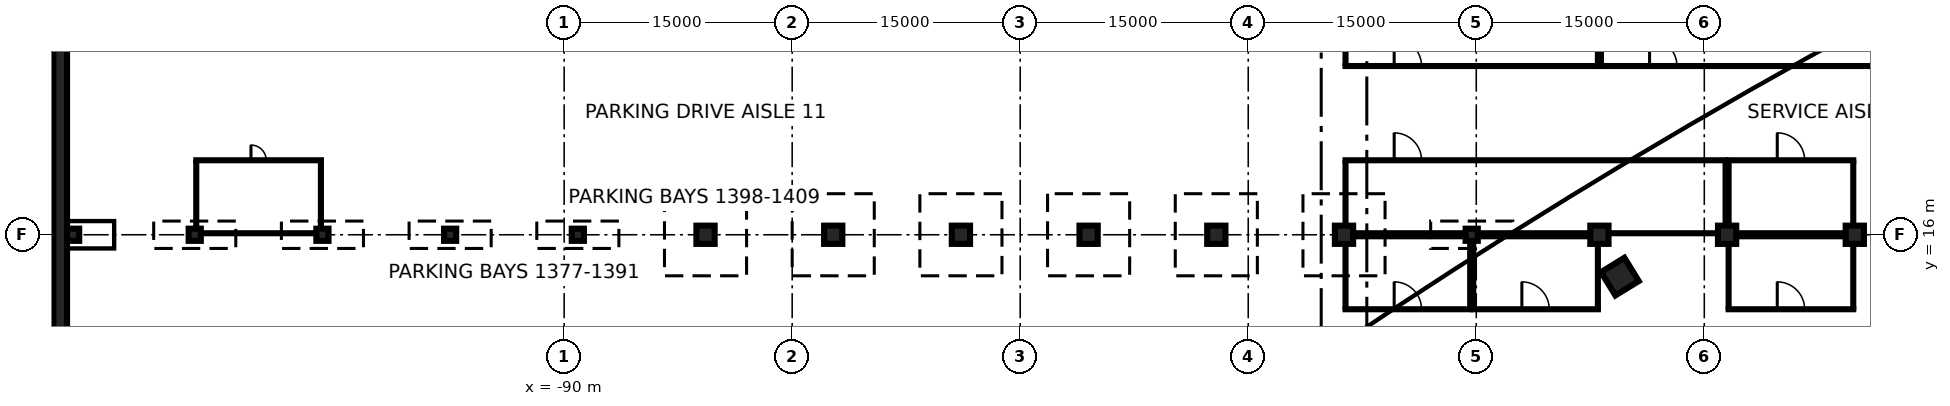
"""IFC4 building model, lengths in metres.
Left out: names, types, materials, properties, quantities, classifications, styles, units other than length and angle.
Written with IfcOpenShell. Run it as: python <this file> out.ifc"""

import sys

from ifc_helpers import new_model, si_unit, direction, frame, frame_2d, origin, origin_2d, place, context, subcontext, project, spatial, rectangle, extrude, element, fill, save


model = new_model("IFC4")
c1 = context("Model", 3, precision=1e-05, world=origin(), true_north=direction((0.0, 1.0)))
c2 = subcontext(c1, "Body", "Model", "MODEL_VIEW")
j1 = project(units=[si_unit("LENGTHUNIT", "METRE"), si_unit("PLANEANGLEUNIT", "RADIAN")], contexts=[c1])
p1 = place(None, origin())
s1 = spatial("IfcSite", under=j1, at=p1, CompositionType="ELEMENT")
p2 = place(p1, origin())
s2 = spatial("IfcBuilding", under=s1, at=p2, CompositionType="ELEMENT")
p3 = place(p2, frame((0.0, 0.0, -12.0)))
s3 = spatial("IfcBuildingStorey", under=s2, at=p3, CompositionType="ELEMENT", Elevation=-12.0)
p4 = place(p3, frame((-123.15, -80.0, 0.0), z_axis=(0.0, 0.0, 1.0), x_axis=(0.0, 1.0, 0.0)))
e1 = element("IfcWall", 1, at=p4, inside=s3, PredefinedType="USERDEFINED", context=c2, shape_type="SweptSolid", body=[
    extrude(rectangle(XDim=160.0, YDim=0.9, at=frame_2d((80.0, 0.0))), origin(), (0.0, 0.0, 1.0), 11.55),
])
p5 = place(p3, frame((-20.552, 13.248, 0.0), z_axis=(0.0, 0.0, 1.0), x_axis=(-0.523429826947, 0.85206878611, 0.0)))
e2 = element("IfcColumn", 2, at=p5, inside=s3, PredefinedType="COLUMN", context=c2, shape_type="SweptSolid", body=[
    extrude(rectangle(XDim=1.8, YDim=1.8, at=origin_2d()), origin(), (0.0, 0.0, 1.0), 4.4),
])
for number, where, z_axis, x_axis in (
    (3, (-122.3, 16.0, 0.0), (0.0, 0.0, 1.0), (1.0, 0.0, 0.0)),
    (4, (-114.3, 16.0, 0.0), (0.0, 0.0, 1.0), (1.0, 0.0, 0.0)),
    (5, (-105.9, 16.0, 0.0), (0.0, 0.0, 1.0), (1.0, 0.0, 0.0)),
    (6, (-97.5, 16.0, 0.0), (0.0, 0.0, 1.0), (1.0, 0.0, 0.0)),
    (7, (-89.1, 16.0, 0.0), (0.0, 0.0, 1.0), (1.0, 0.0, 0.0)),
):
    element("IfcColumn", number, at=place(p3, frame(where, z_axis=z_axis, x_axis=x_axis)), inside=s3, PredefinedType="COLUMN", context=c2, shape_type="SweptSolid", body=[
        extrude(rectangle(XDim=0.8, YDim=0.8, at=origin_2d()), origin(), (0.0, 0.0, 1.0), 4.4),
    ])
for number, where, z_axis, x_axis in (
    (8, (-80.7, 16.0, 0.0), (0.0, 0.0, 1.0), (1.0, 0.0, 0.0)),
    (9, (-72.3, 16.0, 0.0), (0.0, 0.0, 1.0), (1.0, 0.0, 0.0)),
    (10, (-63.9, 16.0, 0.0), (0.0, 0.0, 1.0), (1.0, 0.0, 0.0)),
    (11, (-55.5, 16.0, 0.0), (0.0, 0.0, 1.0), (1.0, 0.0, 0.0)),
    (12, (-47.1, 16.0, 0.0), (0.0, 0.0, 1.0), (1.0, 0.0, 0.0)),
    (13, (-38.7, 16.0, 0.0), (0.0, 0.0, 1.0), (1.0, 0.0, 0.0)),
):
    element("IfcColumn", number, at=place(p3, frame(where, z_axis=z_axis, x_axis=x_axis)), inside=s3, PredefinedType="COLUMN", context=c2, shape_type="SweptSolid", body=[
        extrude(rectangle(XDim=1.2, YDim=1.2, at=origin_2d()), origin(), (0.0, 0.0, 1.0), 4.4),
    ])
p6 = place(p3, frame((-30.3, 16.0, 0.0), z_axis=(0.0, 0.0, 1.0), x_axis=(1.0, 0.0, 0.0)))
e14 = element("IfcColumn", 14, at=p6, inside=s3, PredefinedType="COLUMN", context=c2, shape_type="SweptSolid", body=[
    extrude(rectangle(XDim=0.8, YDim=0.8, at=origin_2d()), origin(), (0.0, 0.0, 1.0), 4.4),
])
for number, where, z_axis, x_axis in (
    (15, (-21.9, 16.0, 0.0), (0.0, 0.0, 1.0), (1.0, 0.0, 0.0)),
    (16, (-13.5, 16.0, 0.0), (0.0, 0.0, 1.0), (1.0, 0.0, 0.0)),
    (17, (-5.1, 16.0, 0.0), (0.0, 0.0, 1.0), (1.0, 0.0, 0.0)),
):
    element("IfcColumn", number, at=place(p3, frame(where, z_axis=z_axis, x_axis=x_axis)), inside=s3, PredefinedType="COLUMN", context=c2, shape_type="SweptSolid", body=[
        extrude(rectangle(XDim=1.2, YDim=1.2, at=origin_2d()), origin(), (0.0, 0.0, 1.0), 4.4),
    ])
p7 = place(p3, frame((-38.7, 11.1, 0.0), z_axis=(0.0, 0.0, 1.0), x_axis=(1.0, 0.0, 0.0)))
e18 = element("IfcWall", 18, at=p7, inside=s3, PredefinedType="PARTITIONING", context=c2, shape_type="SweptSolid", body=[
    extrude(rectangle(XDim=8.4, YDim=0.2, at=frame_2d((4.2, 0.0))), origin(), (0.0, 0.0, 1.0), 4.4),
])
p8 = place(p7, frame((3.3, 0.0, 0.0)))
e19 = element("IfcOpeningElement", 19, at=p8, cuts=e18, PredefinedType="OPENING", context=c2, shape_type="SweptSolid", body=[
    extrude(rectangle(XDim=1.8, YDim=2.1, at=frame_2d((0.9, 1.05))), frame((0.0, 0.11, 0.0), z_axis=(0.0, -1.0, 0.0), x_axis=(1.0, 0.0, 0.0)), (0.0, 0.0, 1.0), 0.22),
])
p9 = place(p3, frame((-38.7, 15.9, 0.0), z_axis=(0.0, 0.0, 1.0), x_axis=(1.0, 0.0, 0.0)))
e20 = element("IfcWall", 20, at=p9, inside=s3, PredefinedType="PARTITIONING", context=c2, shape_type="SweptSolid", body=[
    extrude(rectangle(XDim=8.4, YDim=0.2, at=frame_2d((4.2, 0.0))), origin(), (0.0, 0.0, 1.0), 4.4),
])
p10 = place(p3, frame((-38.6, 11.2, 0.0), z_axis=(0.0, 0.0, 1.0), x_axis=(0.0, 1.0, 0.0)))
e21 = element("IfcWall", 21, at=p10, inside=s3, PredefinedType="PARTITIONING", context=c2, shape_type="SweptSolid", body=[
    extrude(rectangle(XDim=4.2, YDim=0.2, at=frame_2d((2.1, 0.0))), origin(), (0.0, 0.0, 1.0), 4.4),
])
p11 = place(p3, frame((-30.4, 11.2, 0.0), z_axis=(0.0, 0.0, 1.0), x_axis=(0.0, 1.0, 0.0)))
e22 = element("IfcWall", 22, at=p11, inside=s3, PredefinedType="PARTITIONING", context=c2, shape_type="SweptSolid", body=[
    extrude(rectangle(XDim=4.4, YDim=0.2, at=frame_2d((2.2, 0.0))), origin(), (0.0, 0.0, 1.0), 4.4),
])
p12 = place(p3, frame((-30.3, 11.1, 0.0), z_axis=(0.0, 0.0, 1.0), x_axis=(1.0, 0.0, 0.0)))
e23 = element("IfcWall", 23, at=p12, inside=s3, PredefinedType="PARTITIONING", context=c2, shape_type="SweptSolid", body=[
    extrude(rectangle(XDim=8.4, YDim=0.2, at=frame_2d((4.2, 0.0))), origin(), (0.0, 0.0, 1.0), 4.4),
])
p13 = place(p12, frame((3.3, 0.0, 0.0)))
e24 = element("IfcOpeningElement", 24, at=p13, cuts=e23, PredefinedType="OPENING", context=c2, shape_type="SweptSolid", body=[
    extrude(rectangle(XDim=1.8, YDim=2.1, at=frame_2d((0.9, 1.05))), frame((0.0, 0.11, 0.0), z_axis=(0.0, -1.0, 0.0), x_axis=(1.0, 0.0, 0.0)), (0.0, 0.0, 1.0), 0.22),
])
p14 = place(p3, frame((-30.3, 15.9, 0.0), z_axis=(0.0, 0.0, 1.0), x_axis=(1.0, 0.0, 0.0)))
e25 = element("IfcWall", 25, at=p14, inside=s3, PredefinedType="PARTITIONING", context=c2, shape_type="SweptSolid", body=[
    extrude(rectangle(XDim=8.4, YDim=0.2, at=frame_2d((4.2, 0.0))), origin(), (0.0, 0.0, 1.0), 4.4),
])
p15 = place(p3, frame((-30.2, 11.2, 0.0), z_axis=(0.0, 0.0, 1.0), x_axis=(0.0, 1.0, 0.0)))
e26 = element("IfcWall", 26, at=p15, inside=s3, PredefinedType="PARTITIONING", context=c2, shape_type="SweptSolid", body=[
    extrude(rectangle(XDim=4.4, YDim=0.2, at=frame_2d((2.2, 0.0))), origin(), (0.0, 0.0, 1.0), 4.4),
])
p16 = place(p3, frame((-22.0, 11.2, 0.0), z_axis=(0.0, 0.0, 1.0), x_axis=(0.0, 1.0, 0.0)))
e27 = element("IfcWall", 27, at=p16, inside=s3, PredefinedType="PARTITIONING", context=c2, shape_type="SweptSolid", body=[
    extrude(rectangle(XDim=4.2, YDim=0.2, at=frame_2d((2.1, 0.0))), origin(), (0.0, 0.0, 1.0), 4.4),
])
p17 = place(p3, frame((-13.5, 11.1, 0.0), z_axis=(0.0, 0.0, 1.0), x_axis=(1.0, 0.0, 0.0)))
e28 = element("IfcWall", 28, at=p17, inside=s3, PredefinedType="PARTITIONING", context=c2, shape_type="SweptSolid", body=[
    extrude(rectangle(XDim=8.4, YDim=0.2, at=frame_2d((4.2, 0.0))), origin(), (0.0, 0.0, 1.0), 4.4),
])
p18 = place(p17, frame((3.3, 0.0, 0.0)))
e29 = element("IfcOpeningElement", 29, at=p18, cuts=e28, PredefinedType="OPENING", context=c2, shape_type="SweptSolid", body=[
    extrude(rectangle(XDim=1.8, YDim=2.1, at=frame_2d((0.9, 1.05))), frame((0.0, 0.11, 0.0), z_axis=(0.0, -1.0, 0.0), x_axis=(1.0, 0.0, 0.0)), (0.0, 0.0, 1.0), 0.22),
])
p19 = place(p3, frame((-13.5, 15.9, 0.0), z_axis=(0.0, 0.0, 1.0), x_axis=(1.0, 0.0, 0.0)))
e30 = element("IfcWall", 30, at=p19, inside=s3, PredefinedType="PARTITIONING", context=c2, shape_type="SweptSolid", body=[
    extrude(rectangle(XDim=8.4, YDim=0.2, at=frame_2d((4.2, 0.0))), origin(), (0.0, 0.0, 1.0), 4.4),
])
for number, where, z_axis, x_axis in (
    (31, (-13.4, 11.2, 0.0), (0.0, 0.0, 1.0), (0.0, 1.0, 0.0)),
    (32, (-5.2, 11.2, 0.0), (0.0, 0.0, 1.0), (0.0, 1.0, 0.0)),
):
    element("IfcWall", number, at=place(p3, frame(where, z_axis=z_axis, x_axis=x_axis)), inside=s3, PredefinedType="PARTITIONING", context=c2, shape_type="SweptSolid", body=[
        extrude(rectangle(XDim=4.2, YDim=0.2, at=frame_2d((2.1, 0.0))), origin(), (0.0, 0.0, 1.0), 4.4),
    ])
p20 = place(p3, frame((-38.7, 16.1, 0.0), z_axis=(0.0, 0.0, 1.0), x_axis=(1.0, 0.0, 0.0)))
e33 = element("IfcWall", 33, at=p20, inside=s3, PredefinedType="PARTITIONING", context=c2, shape_type="SweptSolid", body=[
    extrude(rectangle(XDim=25.2, YDim=0.2, at=frame_2d((12.6, 0.0))), origin(), (0.0, 0.0, 1.0), 4.4),
])
p21 = place(p3, frame((-38.7, 20.9, 0.0), z_axis=(0.0, 0.0, 1.0), x_axis=(1.0, 0.0, 0.0)))
e34 = element("IfcWall", 34, at=p21, inside=s3, PredefinedType="PARTITIONING", context=c2, shape_type="SweptSolid", body=[
    extrude(rectangle(XDim=25.2, YDim=0.2, at=frame_2d((12.6, 0.0))), origin(), (0.0, 0.0, 1.0), 4.4),
])
p22 = place(p21, frame((3.3, 0.0, 0.0)))
e35 = element("IfcOpeningElement", 35, at=p22, cuts=e34, PredefinedType="OPENING", context=c2, shape_type="SweptSolid", body=[
    extrude(rectangle(XDim=1.8, YDim=2.1, at=frame_2d((0.9, 1.05))), frame((0.0, 0.11, 0.0), z_axis=(0.0, -1.0, 0.0), x_axis=(1.0, 0.0, 0.0)), (0.0, 0.0, 1.0), 0.22),
])
for number, where, z_axis, x_axis in (
    (36, (-38.6, 16.6, 0.0), (0.0, 0.0, 1.0), (0.0, 1.0, 0.0)),
    (37, (-13.6, 16.6, 0.0), (0.0, 0.0, 1.0), (0.0, 1.0, 0.0)),
):
    element("IfcWall", number, at=place(p3, frame(where, z_axis=z_axis, x_axis=x_axis)), inside=s3, PredefinedType="PARTITIONING", context=c2, shape_type="SweptSolid", body=[
        extrude(rectangle(XDim=4.2, YDim=0.2, at=frame_2d((2.1, 0.0))), origin(), (0.0, 0.0, 1.0), 4.4),
    ])
p23 = place(p3, frame((-13.5, 16.1, 0.0), z_axis=(0.0, 0.0, 1.0), x_axis=(1.0, 0.0, 0.0)))
e38 = element("IfcWall", 38, at=p23, inside=s3, PredefinedType="PARTITIONING", context=c2, shape_type="SweptSolid", body=[
    extrude(rectangle(XDim=8.4, YDim=0.2, at=frame_2d((4.2, 0.0))), origin(), (0.0, 0.0, 1.0), 4.4),
])
p24 = place(p3, frame((-13.5, 20.9, 0.0), z_axis=(0.0, 0.0, 1.0), x_axis=(1.0, 0.0, 0.0)))
e39 = element("IfcWall", 39, at=p24, inside=s3, PredefinedType="PARTITIONING", context=c2, shape_type="SweptSolid", body=[
    extrude(rectangle(XDim=8.4, YDim=0.2, at=frame_2d((4.2, 0.0))), origin(), (0.0, 0.0, 1.0), 4.4),
])
p25 = place(p24, frame((3.3, 0.0, 0.0)))
e40 = element("IfcOpeningElement", 40, at=p25, cuts=e39, PredefinedType="OPENING", context=c2, shape_type="SweptSolid", body=[
    extrude(rectangle(XDim=1.8, YDim=2.1, at=frame_2d((0.9, 1.05))), frame((0.0, 0.11, 0.0), z_axis=(0.0, -1.0, 0.0), x_axis=(1.0, 0.0, 0.0)), (0.0, 0.0, 1.0), 0.22),
])
for number, where, z_axis, x_axis in (
    (41, (-13.4, 16.6, 0.0), (0.0, 0.0, 1.0), (0.0, 1.0, 0.0)),
    (42, (-5.2, 16.6, 0.0), (0.0, 0.0, 1.0), (0.0, 1.0, 0.0)),
):
    element("IfcWall", number, at=place(p3, frame(where, z_axis=z_axis, x_axis=x_axis)), inside=s3, PredefinedType="PARTITIONING", context=c2, shape_type="SweptSolid", body=[
        extrude(rectangle(XDim=4.2, YDim=0.2, at=frame_2d((2.1, 0.0))), origin(), (0.0, 0.0, 1.0), 4.4),
    ])
p26 = place(p3, frame((-38.7, 27.1, 0.0), z_axis=(0.0, 0.0, 1.0), x_axis=(1.0, 0.0, 0.0)))
e43 = element("IfcWall", 43, at=p26, inside=s3, PredefinedType="PARTITIONING", context=c2, shape_type="SweptSolid", body=[
    extrude(rectangle(XDim=16.8, YDim=0.2, at=frame_2d((8.4, 0.0))), origin(), (0.0, 0.0, 1.0), 4.4),
])
p27 = place(p26, frame((3.3, 0.0, 0.0)))
e44 = element("IfcOpeningElement", 44, at=p27, cuts=e43, PredefinedType="OPENING", context=c2, shape_type="SweptSolid", body=[
    extrude(rectangle(XDim=1.8, YDim=2.1, at=frame_2d((0.9, 1.05))), frame((0.0, 0.11, 0.0), z_axis=(0.0, -1.0, 0.0), x_axis=(1.0, 0.0, 0.0)), (0.0, 0.0, 1.0), 0.22),
])
for number, where, z_axis, x_axis in (
    (45, (-38.6, 27.2, 0.0), (0.0, 0.0, 1.0), (0.0, 1.0, 0.0)),
    (46, (-22.0, 27.2, 0.0), (0.0, 0.0, 1.0), (0.0, 1.0, 0.0)),
):
    element("IfcWall", number, at=place(p3, frame(where, z_axis=z_axis, x_axis=x_axis)), inside=s3, PredefinedType="PARTITIONING", context=c2, shape_type="SweptSolid", body=[
        extrude(rectangle(XDim=4.4, YDim=0.2, at=frame_2d((2.2, 0.0))), origin(), (0.0, 0.0, 1.0), 4.4),
    ])
p28 = place(p3, frame((-21.9, 27.1, 0.0), z_axis=(0.0, 0.0, 1.0), x_axis=(1.0, 0.0, 0.0)))
e47 = element("IfcWall", 47, at=p28, inside=s3, PredefinedType="PARTITIONING", context=c2, shape_type="SweptSolid", body=[
    extrude(rectangle(XDim=25.2, YDim=0.2, at=frame_2d((12.6, 0.0))), origin(), (0.0, 0.0, 1.0), 4.4),
])
p29 = place(p28, frame((3.3, 0.0, 0.0)))
e48 = element("IfcOpeningElement", 48, at=p29, cuts=e47, PredefinedType="OPENING", context=c2, shape_type="SweptSolid", body=[
    extrude(rectangle(XDim=1.8, YDim=2.1, at=frame_2d((0.9, 1.05))), frame((0.0, 0.11, 0.0), z_axis=(0.0, -1.0, 0.0), x_axis=(1.0, 0.0, 0.0)), (0.0, 0.0, 1.0), 0.22),
])
p30 = place(p3, frame((-21.8, 27.2, 0.0), z_axis=(0.0, 0.0, 1.0), x_axis=(0.0, 1.0, 0.0)))
e49 = element("IfcWall", 49, at=p30, inside=s3, PredefinedType="PARTITIONING", context=c2, shape_type="SweptSolid", body=[
    extrude(rectangle(XDim=4.4, YDim=0.2, at=frame_2d((2.2, 0.0))), origin(), (0.0, 0.0, 1.0), 4.4),
])
p31 = place(p3, frame((-114.3, 16.1, 0.0), z_axis=(0.0, 0.0, 1.0), x_axis=(1.0, 0.0, 0.0)))
e50 = element("IfcWall", 50, at=p31, inside=s3, PredefinedType="PARTITIONING", context=c2, shape_type="SweptSolid", body=[
    extrude(rectangle(XDim=8.4, YDim=0.2, at=frame_2d((4.2, 0.0))), origin(), (0.0, 0.0, 1.0), 4.4),
])
p32 = place(p3, frame((-114.3, 20.9, 0.0), z_axis=(0.0, 0.0, 1.0), x_axis=(1.0, 0.0, 0.0)))
e51 = element("IfcWall", 51, at=p32, inside=s3, PredefinedType="PARTITIONING", context=c2, shape_type="SweptSolid", body=[
    extrude(rectangle(XDim=8.4, YDim=0.2, at=frame_2d((4.2, 0.0))), origin(), (0.0, 0.0, 1.0), 4.4),
])
p33 = place(p32, frame((3.7, 0.0, 0.0)))
e52 = element("IfcOpeningElement", 52, at=p33, cuts=e51, PredefinedType="OPENING", context=c2, shape_type="SweptSolid", body=[
    extrude(rectangle(XDim=1.0, YDim=2.1, at=frame_2d((0.5, 1.05))), frame((0.0, 0.11, 0.0), z_axis=(0.0, -1.0, 0.0), x_axis=(1.0, 0.0, 0.0)), (0.0, 0.0, 1.0), 0.22),
])
for number, where, z_axis, x_axis in (
    (53, (-114.2, 16.4, 0.0), (0.0, 0.0, 1.0), (0.0, 1.0, 0.0)),
    (54, (-106.0, 16.4, 0.0), (0.0, 0.0, 1.0), (0.0, 1.0, 0.0)),
):
    element("IfcWall", number, at=place(p3, frame(where, z_axis=z_axis, x_axis=x_axis)), inside=s3, PredefinedType="PARTITIONING", context=c2, shape_type="SweptSolid", body=[
        extrude(rectangle(XDim=4.4, YDim=0.2, at=frame_2d((2.2, 0.0))), origin(), (0.0, 0.0, 1.0), 4.4),
    ])
p34 = place(p8, origin())
e55 = element("IfcDoor", 55, at=p34, inside=s3, OperationType="DOUBLE_DOOR_SINGLE_SWING", PredefinedType="DOOR", context=c2, shape_type="SweptSolid", body=[
    extrude(rectangle(XDim=1.8, YDim=2.1, at=frame_2d((0.9, 1.05))), frame((0.0, 0.025, 0.0), z_axis=(0.0, -1.0, 0.0), x_axis=(1.0, 0.0, 0.0)), (0.0, 0.0, 1.0), 0.05),
])
fill(e19, e55)
p35 = place(p13, origin())
e56 = element("IfcDoor", 56, at=p35, inside=s3, OperationType="DOUBLE_DOOR_SINGLE_SWING", PredefinedType="DOOR", context=c2, shape_type="SweptSolid", body=[
    extrude(rectangle(XDim=1.8, YDim=2.1, at=frame_2d((0.9, 1.05))), frame((0.0, 0.025, 0.0), z_axis=(0.0, -1.0, 0.0), x_axis=(1.0, 0.0, 0.0)), (0.0, 0.0, 1.0), 0.05),
])
fill(e24, e56)
p36 = place(p18, origin())
e57 = element("IfcDoor", 57, at=p36, inside=s3, OperationType="DOUBLE_DOOR_SINGLE_SWING", PredefinedType="DOOR", context=c2, shape_type="SweptSolid", body=[
    extrude(rectangle(XDim=1.8, YDim=2.1, at=frame_2d((0.9, 1.05))), frame((0.0, 0.025, 0.0), z_axis=(0.0, -1.0, 0.0), x_axis=(1.0, 0.0, 0.0)), (0.0, 0.0, 1.0), 0.05),
])
fill(e29, e57)
p37 = place(p22, origin())
e58 = element("IfcDoor", 58, at=p37, inside=s3, OperationType="DOUBLE_DOOR_SINGLE_SWING", PredefinedType="DOOR", context=c2, shape_type="SweptSolid", body=[
    extrude(rectangle(XDim=1.8, YDim=2.1, at=frame_2d((0.9, 1.05))), frame((0.0, 0.025, 0.0), z_axis=(0.0, -1.0, 0.0), x_axis=(1.0, 0.0, 0.0)), (0.0, 0.0, 1.0), 0.05),
])
fill(e35, e58)
p38 = place(p25, origin())
e59 = element("IfcDoor", 59, at=p38, inside=s3, OperationType="DOUBLE_DOOR_SINGLE_SWING", PredefinedType="DOOR", context=c2, shape_type="SweptSolid", body=[
    extrude(rectangle(XDim=1.8, YDim=2.1, at=frame_2d((0.9, 1.05))), frame((0.0, 0.025, 0.0), z_axis=(0.0, -1.0, 0.0), x_axis=(1.0, 0.0, 0.0)), (0.0, 0.0, 1.0), 0.05),
])
fill(e40, e59)
p39 = place(p27, origin())
e60 = element("IfcDoor", 60, at=p39, inside=s3, OperationType="DOUBLE_DOOR_SINGLE_SWING", PredefinedType="DOOR", context=c2, shape_type="SweptSolid", body=[
    extrude(rectangle(XDim=1.8, YDim=2.1, at=frame_2d((0.9, 1.05))), frame((0.0, 0.025, 0.0), z_axis=(0.0, -1.0, 0.0), x_axis=(1.0, 0.0, 0.0)), (0.0, 0.0, 1.0), 0.05),
])
fill(e44, e60)
p40 = place(p29, origin())
e61 = element("IfcDoor", 61, at=p40, inside=s3, OperationType="DOUBLE_DOOR_SINGLE_SWING", PredefinedType="DOOR", context=c2, shape_type="SweptSolid", body=[
    extrude(rectangle(XDim=1.8, YDim=2.1, at=frame_2d((0.9, 1.05))), frame((0.0, 0.025, 0.0), z_axis=(0.0, -1.0, 0.0), x_axis=(1.0, 0.0, 0.0)), (0.0, 0.0, 1.0), 0.05),
])
fill(e48, e61)
p41 = place(p33, origin())
e62 = element("IfcDoor", 62, at=p41, inside=s3, OperationType="SINGLE_SWING_LEFT", PredefinedType="DOOR", context=c2, shape_type="SweptSolid", body=[
    extrude(rectangle(XDim=1.0, YDim=2.1, at=frame_2d((0.5, 1.05))), frame((0.0, 0.025, 0.0), z_axis=(0.0, -1.0, 0.0), x_axis=(1.0, 0.0, 0.0)), (0.0, 0.0, 1.0), 0.05),
])
fill(e52, e62)
save(model, sys.argv[1])
